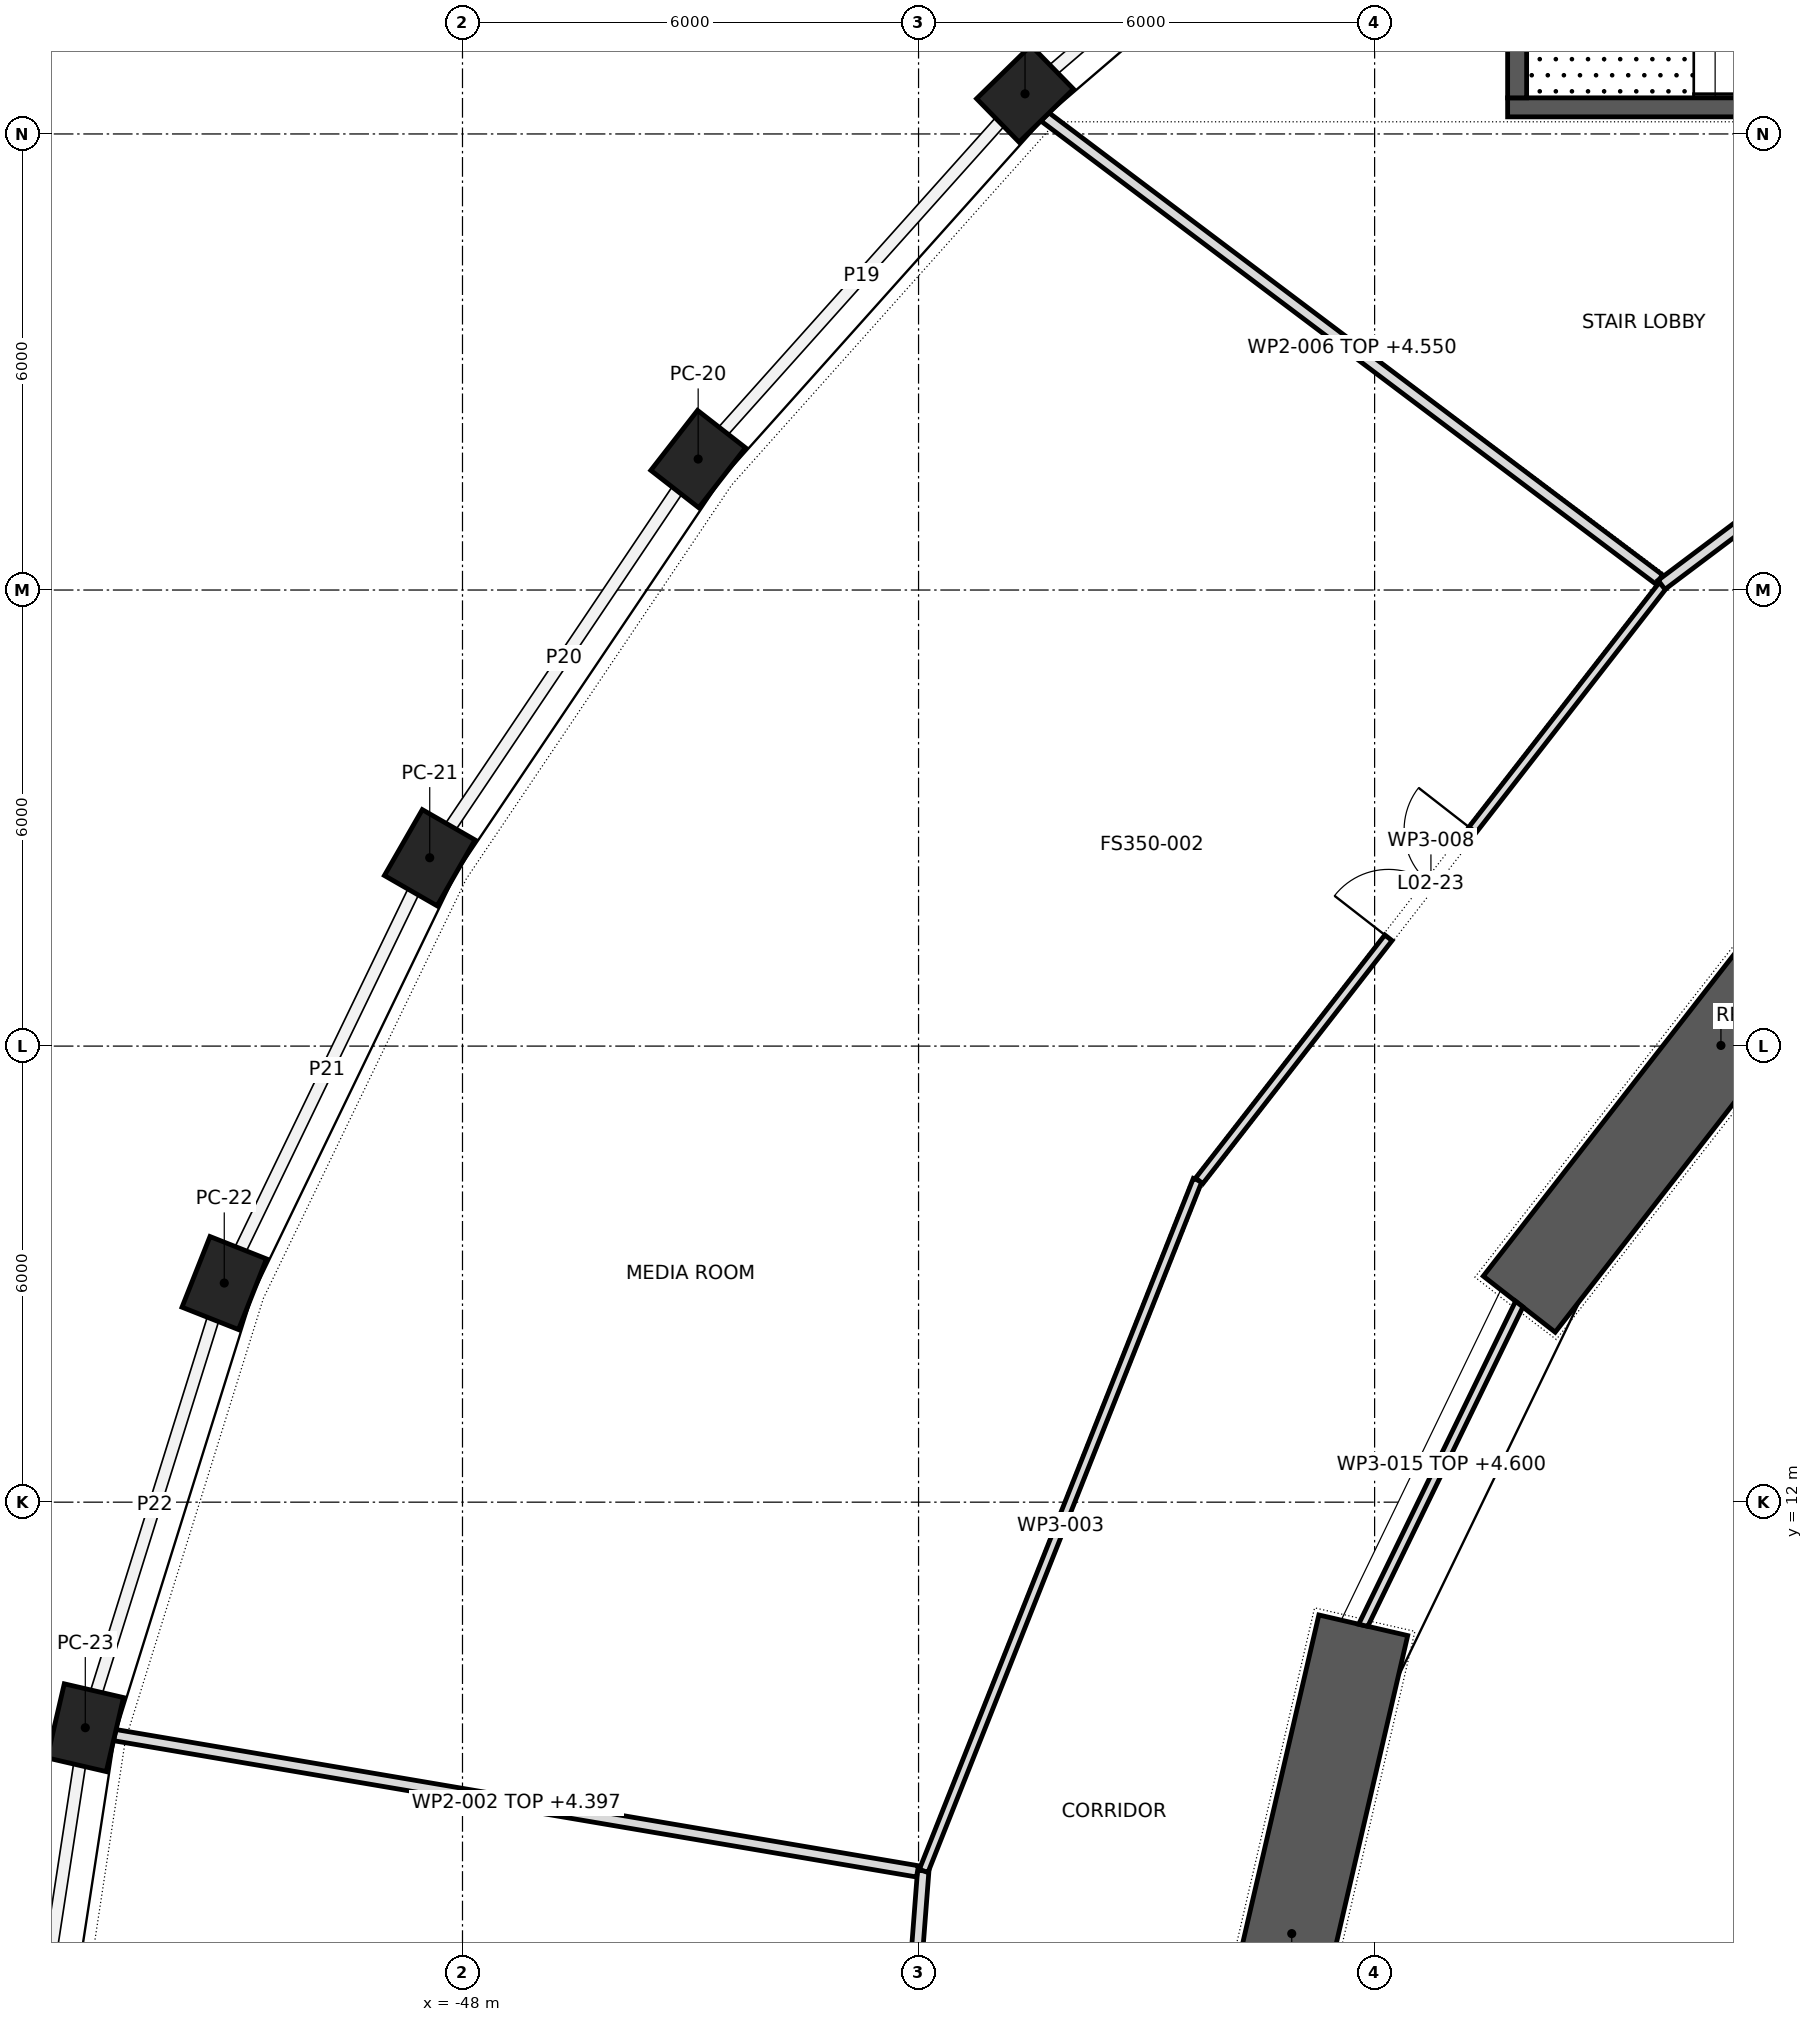
"""IFC4 building model, lengths in metres.
Left out: names, types, materials, properties, quantities, classifications, styles, units other than length and angle.
Written with IfcOpenShell. Run it as: python <this file> out.ifc"""

import sys

from ifc_helpers import new_model, si_unit, direction, frame, frame_2d, origin, origin_2d, place, context, subcontext, project, spatial, polyline, rectangle, outline, extrude, element, fill, save


model = new_model("IFC4")
c1 = context("Model", 3, precision=1e-05, world=origin(), true_north=direction((0.0, 1.0)))
c2 = subcontext(c1, "Body", "Model", "MODEL_VIEW")
j1 = project(units=[si_unit("LENGTHUNIT", "METRE"), si_unit("PLANEANGLEUNIT", "RADIAN")], contexts=[c1])
p1 = place(None, origin())
s1 = spatial("IfcSite", under=j1, at=p1, CompositionType="ELEMENT")
p2 = place(p1, origin())
s2 = spatial("IfcBuilding", under=s1, at=p2, CompositionType="ELEMENT")
p3 = place(p2, frame((0.0, 0.0, 12.5)))
s3 = spatial("IfcBuildingStorey", under=s2, at=p3, CompositionType="ELEMENT", Elevation=12.5)
for number, where, z_axis, x_axis in (
    (1, (-40.599, 30.528, 0.0), (0.0, 0.0, 1.0), (-0.715, -0.699, 0.0)),
    (2, (-44.899, 25.723, 0.0), (0.0, 0.0, 1.0), (-0.615, -0.789, 0.0)),
    (3, (-48.431, 20.478, 0.0), (0.0, 0.0, 1.0), (-0.499, -0.867, 0.0)),
    (4, (-51.134, 14.883, 0.0), (0.0, 0.0, 1.0), (-0.368, -0.93, 0.0)),
    (5, (-52.962, 9.033, 0.0), (0.0, 0.0, 1.0), (-0.226, -0.974, 0.0)),
):
    element("IfcColumn", number, at=place(p3, frame(where, z_axis=z_axis, x_axis=x_axis)), inside=s3, PredefinedType="COLUMN", context=c2, shape_type="SweptSolid", body=[
        extrude(rectangle(XDim=1.0, YDim=0.8, at=origin_2d()), origin(), (0.0, 0.0, 1.0), 5.5),
    ])
p4 = place(p3, frame((-28.79, 21.412, 0.0), z_axis=(0.0, 0.0, 1.0), x_axis=(-0.614825322247, -0.788663314174, 0.0)))
e6 = element("IfcWall", 6, at=p4, inside=s3, PredefinedType="SHEAR", context=c2, shape_type="SweptSolid", body=[
    extrude(rectangle(XDim=8.632, YDim=1.2, at=frame_2d((4.316, 0.0))), origin(), (0.0, 0.0, 1.0), 5.5),
])
p5 = place(p3, frame((-36.149, 10.38, 0.0), z_axis=(0.0, 0.0, 1.0), x_axis=(-0.226058185805, -0.974113800657, 0.0)))
e7 = element("IfcWall", 7, at=p5, inside=s3, PredefinedType="SHEAR", context=c2, shape_type="SweptSolid", body=[
    extrude(rectangle(XDim=8.329, YDim=1.2, at=frame_2d((4.165, 0.0))), origin(), (0.0, 0.0, 1.0), 5.5),
])
p6 = place(p3, frame((-34.25, 30.35, 0.0), z_axis=(0.0, 0.0, 1.0), x_axis=(1.0, 0.0, 0.0)))
e8 = element("IfcWall", 8, at=p6, inside=s3, PredefinedType="SHEAR", context=c2, shape_type="SweptSolid", body=[
    extrude(rectangle(XDim=8.5, YDim=0.25, at=frame_2d((4.25, 0.0))), origin(), (0.0, 0.0, 1.0), 5.15),
])
p7 = place(p3, frame((-34.125, 30.475, 0.0), z_axis=(0.0, 0.0, 1.0), x_axis=(0.0, 1.0, 0.0)))
e9 = element("IfcWall", 9, at=p7, inside=s3, PredefinedType="SHEAR", context=c2, shape_type="SweptSolid", body=[
    extrude(rectangle(XDim=3.05, YDim=0.25, at=frame_2d((1.525, 0.0))), origin(), (0.0, 0.0, 1.0), 5.15),
])
p8 = place(p3, frame((-42.678, -2.497, 0.0), z_axis=(0.0, 0.0, 1.0), x_axis=(0.076457224601, 0.997072862336, 0.0)))
e10 = element("IfcWall", 10, at=p8, inside=s3, PredefinedType="PARTITIONING", context=c2, shape_type="SweptSolid", body=[
    extrude(rectangle(XDim=9.675, YDim=0.15, at=frame_2d((4.838, 0.0))), origin(), (0.0, 0.0, 1.0), 5.15),
])
p9 = place(p8, frame((5.18, 0.0, 0.0)))
e11 = element("IfcOpeningElement", 11, at=p9, cuts=e10, PredefinedType="OPENING", context=c2, shape_type="SweptSolid", body=[
    extrude(rectangle(XDim=1.8, YDim=2.1, at=frame_2d((0.9, 1.05))), frame((0.0, 0.087, 0.0), z_axis=(0.0, -1.0, 0.0), x_axis=(1.0, 0.0, 0.0)), (0.0, 0.0, 1.0), 0.174),
])
p10 = place(p3, frame((-42.014, 7.143, 0.0), z_axis=(0.0, 0.0, 1.0), x_axis=(-0.985896712353, 0.167354929928, 0.0)))
e12 = element("IfcWall", 12, at=p10, inside=s3, PredefinedType="PARTITIONING", context=c2, shape_type="SweptSolid", body=[
    extrude(outline(polyline([(0.0, -0.075), (10.708, -0.075), (10.717, 0.075), (0.0, 0.075), (0.0, -0.075)])), origin(), (0.0, 0.0, 1.0), 4.397),
])
p11 = place(p3, frame((-41.932, 7.149, 0.0), z_axis=(0.0, 0.0, 1.0), x_axis=(0.368547214989, 0.929609030896, 0.0)))
e13 = element("IfcWall", 13, at=p11, inside=s3, PredefinedType="PARTITIONING", context=c2, shape_type="SweptSolid", body=[
    extrude(rectangle(XDim=9.776, YDim=0.12, at=frame_2d((4.888, 0.0))), origin(), (0.0, 0.0, 1.0), 5.15),
])
p12 = place(p3, frame((-40.338, 30.225, 0.0), z_axis=(0.0, 0.0, 1.0), x_axis=(0.79878223103, -0.601620268435, 0.0)))
e14 = element("IfcWall", 14, at=p12, inside=s3, PredefinedType="PARTITIONING", context=c2, shape_type="SweptSolid", body=[
    extrude(outline(polyline([(-0.011, -0.075), (10.118, -0.075), (10.118, 0.075), (0.011, 0.075), (-0.011, -0.075)])), origin(), (0.0, 0.0, 1.0), 4.55),
])
p13 = place(p3, frame((-38.308, 16.228, 0.0), z_axis=(0.0, 0.0, 1.0), x_axis=(0.614374815397, 0.789014313055, 0.0)))
e15 = element("IfcWall", 15, at=p13, inside=s3, PredefinedType="PARTITIONING", context=c2, shape_type="SweptSolid", body=[
    extrude(rectangle(XDim=9.924, YDim=0.12, at=frame_2d((4.962, 0.0))), origin(), (0.0, 0.0, 1.0), 5.15),
])
p14 = place(p13, frame((4.052, 0.0, 0.0)))
e16 = element("IfcOpeningElement", 16, at=p14, cuts=e15, PredefinedType="OPENING", context=c2, shape_type="SweptSolid", body=[
    extrude(rectangle(XDim=1.8, YDim=2.1, at=frame_2d((0.9, 1.05))), frame((0.0, 0.072, 0.0), z_axis=(0.0, -1.0, 0.0), x_axis=(1.0, 0.0, 0.0)), (0.0, 0.0, 1.0), 0.144),
])
p15 = place(p3, frame((-34.097, 14.606, 0.0), z_axis=(0.0, 0.0, 1.0), x_axis=(-0.436936398764, -0.899492403212, 0.0)))
e17 = element("IfcWall", 17, at=p15, inside=s3, PredefinedType="PARTITIONING", context=c2, shape_type="SweptSolid", body=[
    extrude(outline(polyline([(-0.013, -0.06), (4.712, -0.06), (4.684, 0.06), (0.013, 0.06), (-0.013, -0.06)])), origin(), (0.0, 0.0, 1.0), 4.6),
])
p16 = place(p3, frame((-32.225, 24.069, 0.0), z_axis=(0.0, 0.0, 1.0), x_axis=(0.799199975682, 0.601065220147, 0.0)))
e18 = element("IfcWall", 18, at=p16, inside=s3, PredefinedType="PARTITIONING", context=c2, shape_type="SweptSolid", body=[
    extrude(rectangle(XDim=10.666, YDim=0.15, at=frame_2d((5.333, 0.0))), origin(), (0.0, 0.0, 1.0), 5.15),
])
p17 = place(p16, frame((4.418, 0.0, 0.0)))
e19 = element("IfcOpeningElement", 19, at=p17, cuts=e18, PredefinedType="OPENING", context=c2, shape_type="SweptSolid", body=[
    extrude(rectangle(XDim=1.8, YDim=2.1, at=frame_2d((0.9, 1.05))), frame((0.0, 0.087, 0.0), z_axis=(0.0, -1.0, 0.0), x_axis=(1.0, 0.0, 0.0)), (0.0, 0.0, 1.0), 0.174),
])
p18 = place(p14, origin())
e20 = element("IfcDoor", 20, at=p18, inside=s3, OperationType="DOUBLE_DOOR_SINGLE_SWING", PredefinedType="DOOR", context=c2, shape_type="SweptSolid", body=[
    extrude(rectangle(XDim=1.8, YDim=2.1, at=frame_2d((0.9, 1.05))), frame((0.0, 0.025, 0.0), z_axis=(0.0, -1.0, 0.0), x_axis=(1.0, 0.0, 0.0)), (0.0, 0.0, 1.0), 0.05),
])
fill(e16, e20)
save(model, sys.argv[1])
